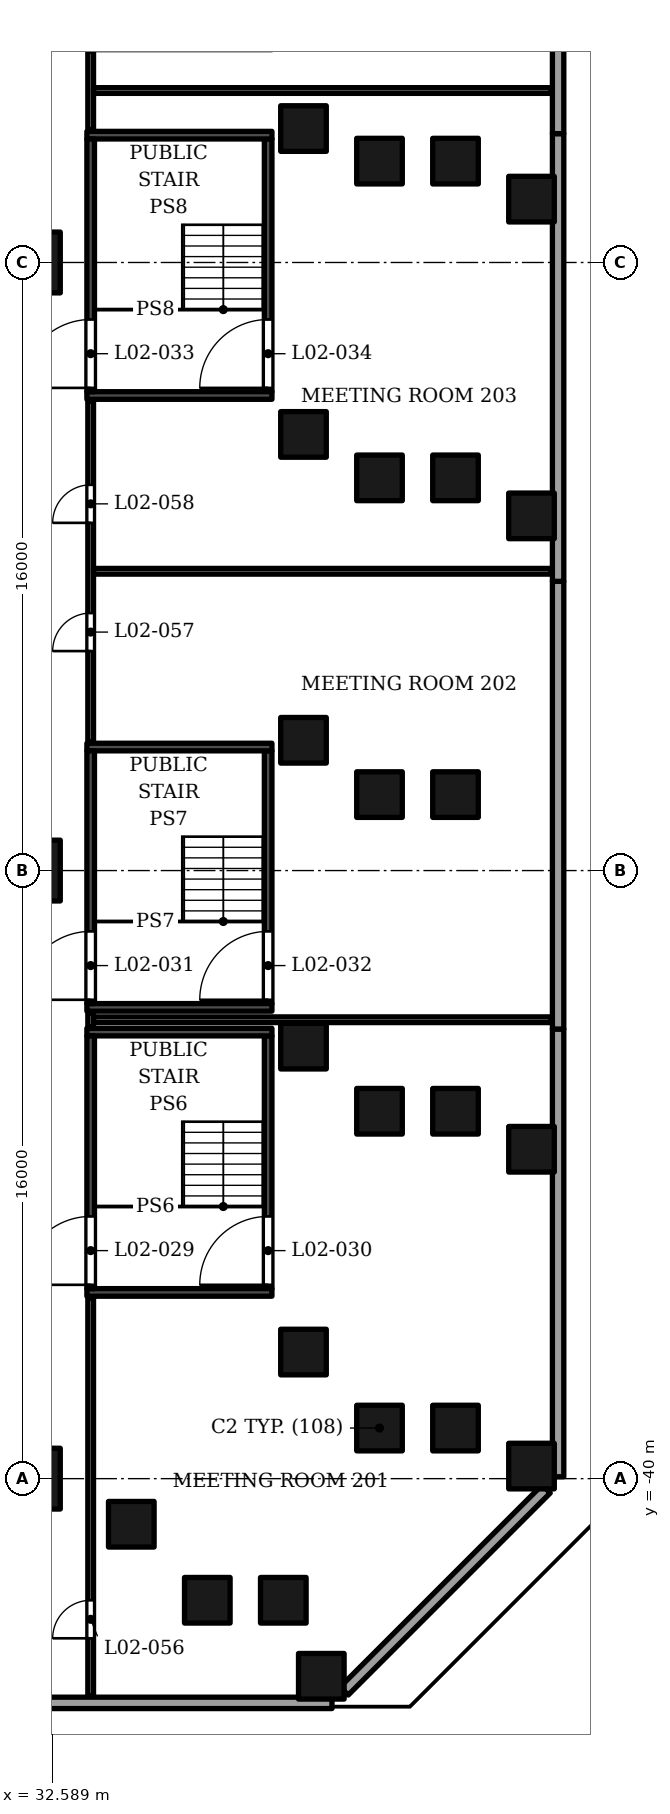
"""IFC4 building model, lengths in metres.
Left out: names, types, materials, properties, quantities, classifications, styles, units other than length and angle.
Written with IfcOpenShell. Run it as: python <this file> out.ifc"""

import sys

from ifc_helpers import new_model, si_unit, direction, frame, frame_2d, origin, origin_2d, place, context, subcontext, project, spatial, rectangle, extrude, element, fill, save


model = new_model("IFC4")
c1 = context("Model", 3, precision=1e-05, world=origin(), true_north=direction((0.0, 1.0)))
c2 = subcontext(c1, "Body", "Model", "MODEL_VIEW")
j1 = project(units=[si_unit("LENGTHUNIT", "METRE"), si_unit("PLANEANGLEUNIT", "RADIAN")], contexts=[c1])
p1 = place(None, origin())
s1 = spatial("IfcSite", under=j1, at=p1, CompositionType="ELEMENT")
p2 = place(p1, origin())
s2 = spatial("IfcBuilding", under=s1, at=p2, CompositionType="ELEMENT")
p3 = place(p2, frame((0.0, 0.0, 20.0)))
s3 = spatial("IfcBuildingStorey", under=s2, at=p3, CompositionType="ELEMENT", Elevation=20.0)
for number, where, z_axis, x_axis in (
    (1, (32.0, -40.0, 0.0), (0.0, 0.0, 1.0), (1.0, 0.0, 0.0)),
    (2, (32.0, -24.0, 0.0), (0.0, 0.0, 1.0), (1.0, 0.0, 0.0)),
    (3, (32.0, -8.0, 0.0), (0.0, 0.0, 1.0), (1.0, 0.0, 0.0)),
):
    element("IfcColumn", number, at=place(p3, frame(where, z_axis=z_axis, x_axis=x_axis)), inside=s3, PredefinedType="COLUMN", context=c2, shape_type="SweptSolid", body=[
        extrude(rectangle(XDim=1.6, YDim=1.6, at=origin_2d()), origin(), (0.0, 0.0, 1.0), 9.0),
    ])
for number, where, z_axis, x_axis in (
    (4, (39.2, -36.669, 0.0), (0.0, 0.0, 1.0), (1.0, 0.0, 0.0)),
    (5, (34.669, -41.2, 0.0), (0.0, 0.0, 1.0), (1.0, 0.0, 0.0)),
    (6, (39.2, -4.476, 0.0), (0.0, 0.0, 1.0), (1.0, 0.0, 0.0)),
    (7, (39.2, -12.524, 0.0), (0.0, 0.0, 1.0), (1.0, 0.0, 0.0)),
    (8, (39.2, -20.572, 0.0), (0.0, 0.0, 1.0), (1.0, 0.0, 0.0)),
    (9, (39.2, -28.62, 0.0), (0.0, 0.0, 1.0), (1.0, 0.0, 0.0)),
    (10, (41.2, -38.669, 0.0), (0.0, 0.0, 1.0), (1.0, 0.0, 0.0)),
    (11, (36.669, -43.2, 0.0), (0.0, 0.0, 1.0), (1.0, 0.0, 0.0)),
    (12, (41.2, -5.333, 0.0), (0.0, 0.0, 1.0), (1.0, 0.0, 0.0)),
    (13, (41.2, -13.667, 0.0), (0.0, 0.0, 1.0), (1.0, 0.0, 0.0)),
    (14, (41.2, -22.001, 0.0), (0.0, 0.0, 1.0), (1.0, 0.0, 0.0)),
    (15, (41.2, -30.333, 0.0), (0.0, 0.0, 1.0), (1.0, 0.0, 0.0)),
    (16, (43.2, -38.669, 0.0), (0.0, 0.0, 1.0), (1.0, 0.0, 0.0)),
    (17, (38.669, -43.2, 0.0), (0.0, 0.0, 1.0), (1.0, 0.0, 0.0)),
    (18, (43.2, -5.333, 0.0), (0.0, 0.0, 1.0), (1.0, 0.0, 0.0)),
    (19, (43.2, -13.667, 0.0), (0.0, 0.0, 1.0), (1.0, 0.0, 0.0)),
    (20, (43.2, -22.001, 0.0), (0.0, 0.0, 1.0), (1.0, 0.0, 0.0)),
    (21, (43.2, -30.333, 0.0), (0.0, 0.0, 1.0), (1.0, 0.0, 0.0)),
    (22, (45.2, -39.669, 0.0), (0.0, 0.0, 1.0), (1.0, 0.0, 0.0)),
    (23, (39.669, -45.2, 0.0), (0.0, 0.0, 1.0), (1.0, 0.0, 0.0)),
    (24, (45.2, -6.333, 0.0), (0.0, 0.0, 1.0), (1.0, 0.0, 0.0)),
    (25, (45.2, -14.667, 0.0), (0.0, 0.0, 1.0), (1.0, 0.0, 0.0)),
    (26, (45.2, -31.333, 0.0), (0.0, 0.0, 1.0), (1.0, 0.0, 0.0)),
):
    element("IfcColumn", number, at=place(p3, frame(where, z_axis=z_axis, x_axis=x_axis)), inside=s3, PredefinedType="COLUMN", context=c2, shape_type="SweptSolid", body=[
        extrude(rectangle(XDim=1.2, YDim=1.2, at=origin_2d()), origin(), (0.0, 0.0, 1.0), 9.0),
    ])
p4 = place(p3, frame((28.536, -45.9, 0.0), z_axis=(0.0, 0.0, 1.0), x_axis=(1.0, 0.0, 0.0)))
e27 = element("IfcWall", 27, at=p4, inside=s3, PredefinedType="SOLIDWALL", context=c2, shape_type="SweptSolid", body=[
    extrude(rectangle(XDim=11.414, YDim=0.3, at=frame_2d((5.707, 0.0))), origin(), (0.0, 0.0, 1.0), 7.6),
])
p5 = place(p3, frame((40.271, -45.588, 0.0), z_axis=(0.0, 0.0, 1.0), x_axis=(0.707106781187, 0.707106781187, 0.0)))
e28 = element("IfcWall", 28, at=p5, inside=s3, PredefinedType="SOLIDWALL", context=c2, shape_type="SweptSolid", body=[
    extrude(rectangle(XDim=7.519, YDim=0.3, at=frame_2d((3.759, 0.0))), origin(), (0.0, 0.0, 1.0), 7.6),
])
for number, where, z_axis, x_axis in (
    (29, (45.9, -39.95, 0.0), (0.0, 0.0, 1.0), (0.0, 1.0, 0.0)),
    (30, (45.9, -28.17, 0.0), (0.0, 0.0, 1.0), (0.0, 1.0, 0.0)),
):
    element("IfcWall", number, at=place(p3, frame(where, z_axis=z_axis, x_axis=x_axis)), inside=s3, PredefinedType="SOLIDWALL", context=c2, shape_type="SweptSolid", body=[
        extrude(rectangle(XDim=11.78, YDim=0.3, at=frame_2d((5.89, 0.0))), origin(), (0.0, 0.0, 1.0), 7.6),
    ])
p6 = place(p3, frame((45.9, -16.39, 0.0), z_axis=(0.0, 0.0, 1.0), x_axis=(0.0, 1.0, 0.0)))
e31 = element("IfcWall", 31, at=p6, inside=s3, PredefinedType="SOLIDWALL", context=c2, shape_type="SweptSolid", body=[
    extrude(rectangle(XDim=11.78, YDim=0.3, at=frame_2d((5.89, 0.0))), origin(), (0.0, 0.0, 1.0), 7.6),
])
p7 = place(p3, frame((45.9, -4.61, 0.0), z_axis=(0.0, 0.0, 1.0), x_axis=(0.0, 1.0, 0.0)))
e32 = element("IfcWall", 32, at=p7, inside=s3, PredefinedType="SOLIDWALL", context=c2, shape_type="SweptSolid", body=[
    extrude(rectangle(XDim=11.78, YDim=0.3, at=frame_2d((5.89, 0.0))), origin(), (0.0, 0.0, 1.0), 7.6),
])
p8 = place(p3, frame((24.0, -45.85, 9.0), z_axis=(0.0, 0.0, 1.0), x_axis=(1.0, 0.0, 0.0)))
e33 = element("IfcWall", 33, at=p8, inside=s3, PredefinedType="PARAPET", context=c2, shape_type="SweptSolid", body=[
    extrude(rectangle(XDim=16.0, YDim=0.3, at=frame_2d((8.0, 0.0))), origin(), (0.0, 0.0, 1.0), 1.1),
])
p9 = place(p3, frame((40.042, -45.745, 9.0), z_axis=(0.0, 0.0, 1.0), x_axis=(0.7071215324, 0.707092029666, 0.0)))
e34 = element("IfcWall", 34, at=p9, inside=s3, PredefinedType="PARAPET", context=c2, shape_type="SweptSolid", body=[
    extrude(rectangle(XDim=8.275, YDim=0.3, at=frame_2d((4.138, 0.0))), origin(), (0.0, 0.0, 1.0), 1.1),
])
for number, where, z_axis, x_axis in (
    (35, (45.85, -39.79, 9.0), (0.0, 0.0, 1.0), (0.0, 1.0, 0.0)),
    (36, (45.85, -25.093, 9.0), (0.0, 0.0, 1.0), (0.0, 1.0, 0.0)),
    (37, (45.85, -10.395, 9.0), (0.0, 0.0, 1.0), (0.0, 1.0, 0.0)),
):
    element("IfcWall", number, at=place(p3, frame(where, z_axis=z_axis, x_axis=x_axis)), inside=s3, PredefinedType="PARAPET", context=c2, shape_type="SweptSolid", body=[
        extrude(rectangle(XDim=14.698, YDim=0.3, at=frame_2d((7.349, 0.0))), origin(), (0.0, 0.0, 1.0), 1.1),
    ])
for number, where, z_axis, x_axis in (
    (38, (33.5, -35.1, 0.0), (0.0, 0.0, 1.0), (1.0, 0.0, 0.0)),
    (39, (33.5, -28.25, 0.0), (0.0, 0.0, 1.0), (1.0, 0.0, 0.0)),
):
    element("IfcWall", number, at=place(p3, frame(where, z_axis=z_axis, x_axis=x_axis)), inside=s3, PredefinedType="SOLIDWALL", context=c2, shape_type="SweptSolid", body=[
        extrude(rectangle(XDim=4.87, YDim=0.2, at=frame_2d((2.435, 0.0))), origin(), (0.0, 0.0, 1.0), 8.55),
    ])
p10 = place(p3, frame((33.6, -35.0, 0.0), z_axis=(0.0, 0.0, 1.0), x_axis=(0.0, 1.0, 0.0)))
e40 = element("IfcWall", 40, at=p10, inside=s3, PredefinedType="SOLIDWALL", context=c2, shape_type="SweptSolid", body=[
    extrude(rectangle(XDim=6.65, YDim=0.2, at=frame_2d((3.325, 0.0))), origin(), (0.0, 0.0, 1.0), 8.55),
])
p11 = place(p10, frame((0.1, 0.0, 0.0)))
e41 = element("IfcOpeningElement", 41, at=p11, cuts=e40, PredefinedType="OPENING", context=c2, shape_type="SweptSolid", body=[
    extrude(rectangle(XDim=1.8, YDim=2.4, at=frame_2d((0.9, 1.2))), frame((0.0, 0.11, 0.0), z_axis=(0.0, -1.0, 0.0), x_axis=(1.0, 0.0, 0.0)), (0.0, 0.0, 1.0), 0.22),
])
p12 = place(p3, frame((38.27, -35.0, 0.0), z_axis=(0.0, 0.0, 1.0), x_axis=(0.0, 1.0, 0.0)))
e42 = element("IfcWall", 42, at=p12, inside=s3, PredefinedType="SOLIDWALL", context=c2, shape_type="SweptSolid", body=[
    extrude(rectangle(XDim=6.65, YDim=0.2, at=frame_2d((3.325, 0.0))), origin(), (0.0, 0.0, 1.0), 8.55),
])
p13 = place(p12, frame((0.1, 0.0, 0.0)))
e43 = element("IfcOpeningElement", 43, at=p13, cuts=e42, PredefinedType="OPENING", context=c2, shape_type="SweptSolid", body=[
    extrude(rectangle(XDim=1.8, YDim=2.4, at=frame_2d((0.9, 1.2))), frame((0.0, 0.11, 0.0), z_axis=(0.0, -1.0, 0.0), x_axis=(1.0, 0.0, 0.0)), (0.0, 0.0, 1.0), 0.22),
])
for number, where, z_axis, x_axis in (
    (44, (33.5, -27.6, 0.0), (0.0, 0.0, 1.0), (1.0, 0.0, 0.0)),
    (45, (33.5, -20.75, 0.0), (0.0, 0.0, 1.0), (1.0, 0.0, 0.0)),
):
    element("IfcWall", number, at=place(p3, frame(where, z_axis=z_axis, x_axis=x_axis)), inside=s3, PredefinedType="SOLIDWALL", context=c2, shape_type="SweptSolid", body=[
        extrude(rectangle(XDim=4.87, YDim=0.2, at=frame_2d((2.435, 0.0))), origin(), (0.0, 0.0, 1.0), 8.55),
    ])
p14 = place(p3, frame((33.6, -27.5, 0.0), z_axis=(0.0, 0.0, 1.0), x_axis=(0.0, 1.0, 0.0)))
e46 = element("IfcWall", 46, at=p14, inside=s3, PredefinedType="SOLIDWALL", context=c2, shape_type="SweptSolid", body=[
    extrude(rectangle(XDim=6.65, YDim=0.2, at=frame_2d((3.325, 0.0))), origin(), (0.0, 0.0, 1.0), 8.55),
])
p15 = place(p14, frame((0.1, 0.0, 0.0)))
e47 = element("IfcOpeningElement", 47, at=p15, cuts=e46, PredefinedType="OPENING", context=c2, shape_type="SweptSolid", body=[
    extrude(rectangle(XDim=1.8, YDim=2.4, at=frame_2d((0.9, 1.2))), frame((0.0, 0.11, 0.0), z_axis=(0.0, -1.0, 0.0), x_axis=(1.0, 0.0, 0.0)), (0.0, 0.0, 1.0), 0.22),
])
p16 = place(p3, frame((38.27, -27.5, 0.0), z_axis=(0.0, 0.0, 1.0), x_axis=(0.0, 1.0, 0.0)))
e48 = element("IfcWall", 48, at=p16, inside=s3, PredefinedType="SOLIDWALL", context=c2, shape_type="SweptSolid", body=[
    extrude(rectangle(XDim=6.65, YDim=0.2, at=frame_2d((3.325, 0.0))), origin(), (0.0, 0.0, 1.0), 8.55),
])
p17 = place(p16, frame((0.1, 0.0, 0.0)))
e49 = element("IfcOpeningElement", 49, at=p17, cuts=e48, PredefinedType="OPENING", context=c2, shape_type="SweptSolid", body=[
    extrude(rectangle(XDim=1.8, YDim=2.4, at=frame_2d((0.9, 1.2))), frame((0.0, 0.11, 0.0), z_axis=(0.0, -1.0, 0.0), x_axis=(1.0, 0.0, 0.0)), (0.0, 0.0, 1.0), 0.22),
])
for number, where, z_axis, x_axis in (
    (50, (33.5, -11.5, 0.0), (0.0, 0.0, 1.0), (1.0, 0.0, 0.0)),
    (51, (33.5, -4.65, 0.0), (0.0, 0.0, 1.0), (1.0, 0.0, 0.0)),
):
    element("IfcWall", number, at=place(p3, frame(where, z_axis=z_axis, x_axis=x_axis)), inside=s3, PredefinedType="SOLIDWALL", context=c2, shape_type="SweptSolid", body=[
        extrude(rectangle(XDim=4.87, YDim=0.2, at=frame_2d((2.435, 0.0))), origin(), (0.0, 0.0, 1.0), 8.55),
    ])
p18 = place(p3, frame((33.6, -11.4, 0.0), z_axis=(0.0, 0.0, 1.0), x_axis=(0.0, 1.0, 0.0)))
e52 = element("IfcWall", 52, at=p18, inside=s3, PredefinedType="SOLIDWALL", context=c2, shape_type="SweptSolid", body=[
    extrude(rectangle(XDim=6.65, YDim=0.2, at=frame_2d((3.325, 0.0))), origin(), (0.0, 0.0, 1.0), 8.55),
])
p19 = place(p18, frame((0.1, 0.0, 0.0)))
e53 = element("IfcOpeningElement", 53, at=p19, cuts=e52, PredefinedType="OPENING", context=c2, shape_type="SweptSolid", body=[
    extrude(rectangle(XDim=1.8, YDim=2.4, at=frame_2d((0.9, 1.2))), frame((0.0, 0.11, 0.0), z_axis=(0.0, -1.0, 0.0), x_axis=(1.0, 0.0, 0.0)), (0.0, 0.0, 1.0), 0.22),
])
p20 = place(p3, frame((38.27, -11.4, 0.0), z_axis=(0.0, 0.0, 1.0), x_axis=(0.0, 1.0, 0.0)))
e54 = element("IfcWall", 54, at=p20, inside=s3, PredefinedType="SOLIDWALL", context=c2, shape_type="SweptSolid", body=[
    extrude(rectangle(XDim=6.65, YDim=0.2, at=frame_2d((3.325, 0.0))), origin(), (0.0, 0.0, 1.0), 8.55),
])
p21 = place(p20, frame((0.1, 0.0, 0.0)))
e55 = element("IfcOpeningElement", 55, at=p21, cuts=e54, PredefinedType="OPENING", context=c2, shape_type="SweptSolid", body=[
    extrude(rectangle(XDim=1.8, YDim=2.4, at=frame_2d((0.9, 1.2))), frame((0.0, 0.11, 0.0), z_axis=(0.0, -1.0, 0.0), x_axis=(1.0, 0.0, 0.0)), (0.0, 0.0, 1.0), 0.22),
])
p22 = place(p3, frame((33.6, -45.72, 0.0), z_axis=(0.0, 0.0, 1.0), x_axis=(0.0, 1.0, 0.0)))
e56 = element("IfcWall", 56, at=p22, inside=s3, PredefinedType="PARTITIONING", context=c2, shape_type="SweptSolid", body=[
    extrude(rectangle(XDim=10.48, YDim=0.15, at=frame_2d((5.24, 0.0))), origin(), (0.0, 0.0, 1.0), 7.35),
])
p23 = place(p22, frame((1.519, 0.0, 0.0)))
e57 = element("IfcOpeningElement", 57, at=p23, cuts=e56, PredefinedType="OPENING", context=c2, shape_type="SweptSolid", body=[
    extrude(rectangle(XDim=1.0, YDim=2.1, at=frame_2d((0.5, 1.05))), frame((0.0, 0.085, 0.0), z_axis=(0.0, -1.0, 0.0), x_axis=(1.0, 0.0, 0.0)), (0.0, 0.0, 1.0), 0.17),
])
p24 = place(p3, frame((33.6, -28.11, 0.0), z_axis=(0.0, 0.0, 1.0), x_axis=(0.0, 1.0, 0.0)))
e58 = element("IfcWall", 58, at=p24, inside=s3, PredefinedType="PARTITIONING", context=c2, shape_type="SweptSolid", body=[
    extrude(rectangle(XDim=0.37, YDim=0.15, at=frame_2d((0.185, 0.0))), origin(), (0.0, 0.0, 1.0), 8.55),
])
p25 = place(p3, frame((33.675, -27.925, 0.0), z_axis=(0.0, 0.0, 1.0), x_axis=(1.0, 0.0, 0.0)))
e59 = element("IfcWall", 59, at=p25, inside=s3, PredefinedType="PARTITIONING", context=c2, shape_type="SweptSolid", body=[
    extrude(rectangle(XDim=12.045, YDim=0.15, at=frame_2d((6.022, 0.0))), origin(), (0.0, 0.0, 1.0), 7.65),
])
p26 = place(p3, frame((33.6, -20.61, 0.0), z_axis=(0.0, 0.0, 1.0), x_axis=(0.0, 1.0, 0.0)))
e60 = element("IfcWall", 60, at=p26, inside=s3, PredefinedType="PARTITIONING", context=c2, shape_type="SweptSolid", body=[
    extrude(rectangle(XDim=8.97, YDim=0.15, at=frame_2d((4.485, 0.0))), origin(), (0.0, 0.0, 1.0), 8.55),
])
p27 = place(p26, frame((2.385, 0.0, 0.0)))
e61 = element("IfcOpeningElement", 61, at=p27, cuts=e60, PredefinedType="OPENING", context=c2, shape_type="SweptSolid", body=[
    extrude(rectangle(XDim=1.0, YDim=2.1, at=frame_2d((0.5, 1.05))), frame((0.0, 0.085, 0.0), z_axis=(0.0, -1.0, 0.0), x_axis=(1.0, 0.0, 0.0)), (0.0, 0.0, 1.0), 0.17),
])
p28 = place(p26, frame((5.759, 0.0, 0.0)))
e62 = element("IfcOpeningElement", 62, at=p28, cuts=e60, PredefinedType="OPENING", context=c2, shape_type="SweptSolid", body=[
    extrude(rectangle(XDim=1.0, YDim=2.1, at=frame_2d((0.5, 1.05))), frame((0.0, 0.085, 0.0), z_axis=(0.0, -1.0, 0.0), x_axis=(1.0, 0.0, 0.0)), (0.0, 0.0, 1.0), 0.17),
])
p29 = place(p3, frame((33.675, -16.125, 0.0), z_axis=(0.0, 0.0, 1.0), x_axis=(1.0, 0.0, 0.0)))
e63 = element("IfcWall", 63, at=p29, inside=s3, PredefinedType="PARTITIONING", context=c2, shape_type="SweptSolid", body=[
    extrude(rectangle(XDim=12.045, YDim=0.15, at=frame_2d((6.022, 0.0))), origin(), (0.0, 0.0, 1.0), 7.65),
])
p30 = place(p3, frame((33.6, -4.51, 0.0), z_axis=(0.0, 0.0, 1.0), x_axis=(0.0, 1.0, 0.0)))
e64 = element("IfcWall", 64, at=p30, inside=s3, PredefinedType="PARTITIONING", context=c2, shape_type="SweptSolid", body=[
    extrude(rectangle(XDim=2.07, YDim=0.15, at=frame_2d((1.035, 0.0))), origin(), (0.0, 0.0, 1.0), 8.55),
])
p31 = place(p3, frame((33.675, -3.475, 0.0), z_axis=(0.0, 0.0, 1.0), x_axis=(1.0, 0.0, 0.0)))
e65 = element("IfcWall", 65, at=p31, inside=s3, PredefinedType="PARTITIONING", context=c2, shape_type="SweptSolid", body=[
    extrude(rectangle(XDim=12.045, YDim=0.15, at=frame_2d((6.022, 0.0))), origin(), (0.0, 0.0, 1.0), 7.65),
])
p32 = place(p11, origin())
e66 = element("IfcDoor", 66, at=p32, inside=s3, OperationType="DOUBLE_DOOR_SINGLE_SWING", PredefinedType="DOOR", context=c2, shape_type="SweptSolid", body=[
    extrude(rectangle(XDim=1.8, YDim=2.4, at=frame_2d((0.9, 1.2))), frame((0.0, 0.025, 0.0), z_axis=(0.0, -1.0, 0.0), x_axis=(1.0, 0.0, 0.0)), (0.0, 0.0, 1.0), 0.05),
])
fill(e41, e66)
p33 = place(p13, origin())
e67 = element("IfcDoor", 67, at=p33, inside=s3, OperationType="DOUBLE_DOOR_SINGLE_SWING", PredefinedType="DOOR", context=c2, shape_type="SweptSolid", body=[
    extrude(rectangle(XDim=1.8, YDim=2.4, at=frame_2d((0.9, 1.2))), frame((0.0, 0.025, 0.0), z_axis=(0.0, -1.0, 0.0), x_axis=(1.0, 0.0, 0.0)), (0.0, 0.0, 1.0), 0.05),
])
fill(e43, e67)
p34 = place(p15, origin())
e68 = element("IfcDoor", 68, at=p34, inside=s3, OperationType="DOUBLE_DOOR_SINGLE_SWING", PredefinedType="DOOR", context=c2, shape_type="SweptSolid", body=[
    extrude(rectangle(XDim=1.8, YDim=2.4, at=frame_2d((0.9, 1.2))), frame((0.0, 0.025, 0.0), z_axis=(0.0, -1.0, 0.0), x_axis=(1.0, 0.0, 0.0)), (0.0, 0.0, 1.0), 0.05),
])
fill(e47, e68)
p35 = place(p17, origin())
e69 = element("IfcDoor", 69, at=p35, inside=s3, OperationType="DOUBLE_DOOR_SINGLE_SWING", PredefinedType="DOOR", context=c2, shape_type="SweptSolid", body=[
    extrude(rectangle(XDim=1.8, YDim=2.4, at=frame_2d((0.9, 1.2))), frame((0.0, 0.025, 0.0), z_axis=(0.0, -1.0, 0.0), x_axis=(1.0, 0.0, 0.0)), (0.0, 0.0, 1.0), 0.05),
])
fill(e49, e69)
p36 = place(p19, origin())
e70 = element("IfcDoor", 70, at=p36, inside=s3, OperationType="DOUBLE_DOOR_SINGLE_SWING", PredefinedType="DOOR", context=c2, shape_type="SweptSolid", body=[
    extrude(rectangle(XDim=1.8, YDim=2.4, at=frame_2d((0.9, 1.2))), frame((0.0, 0.025, 0.0), z_axis=(0.0, -1.0, 0.0), x_axis=(1.0, 0.0, 0.0)), (0.0, 0.0, 1.0), 0.05),
])
fill(e53, e70)
p37 = place(p21, origin())
e71 = element("IfcDoor", 71, at=p37, inside=s3, OperationType="DOUBLE_DOOR_SINGLE_SWING", PredefinedType="DOOR", context=c2, shape_type="SweptSolid", body=[
    extrude(rectangle(XDim=1.8, YDim=2.4, at=frame_2d((0.9, 1.2))), frame((0.0, 0.025, 0.0), z_axis=(0.0, -1.0, 0.0), x_axis=(1.0, 0.0, 0.0)), (0.0, 0.0, 1.0), 0.05),
])
fill(e55, e71)
p38 = place(p23, origin())
e72 = element("IfcDoor", 72, at=p38, inside=s3, OperationType="SINGLE_SWING_LEFT", PredefinedType="DOOR", context=c2, shape_type="SweptSolid", body=[
    extrude(rectangle(XDim=1.0, YDim=2.1, at=frame_2d((0.5, 1.05))), frame((0.0, 0.025, 0.0), z_axis=(0.0, -1.0, 0.0), x_axis=(1.0, 0.0, 0.0)), (0.0, 0.0, 1.0), 0.05),
])
fill(e57, e72)
p39 = place(p27, origin())
e73 = element("IfcDoor", 73, at=p39, inside=s3, OperationType="SINGLE_SWING_LEFT", PredefinedType="DOOR", context=c2, shape_type="SweptSolid", body=[
    extrude(rectangle(XDim=1.0, YDim=2.1, at=frame_2d((0.5, 1.05))), frame((0.0, 0.025, 0.0), z_axis=(0.0, -1.0, 0.0), x_axis=(1.0, 0.0, 0.0)), (0.0, 0.0, 1.0), 0.05),
])
fill(e61, e73)
p40 = place(p28, origin())
e74 = element("IfcDoor", 74, at=p40, inside=s3, OperationType="SINGLE_SWING_LEFT", PredefinedType="DOOR", context=c2, shape_type="SweptSolid", body=[
    extrude(rectangle(XDim=1.0, YDim=2.1, at=frame_2d((0.5, 1.05))), frame((0.0, 0.025, 0.0), z_axis=(0.0, -1.0, 0.0), x_axis=(1.0, 0.0, 0.0)), (0.0, 0.0, 1.0), 0.05),
])
fill(e62, e74)
save(model, sys.argv[1])
